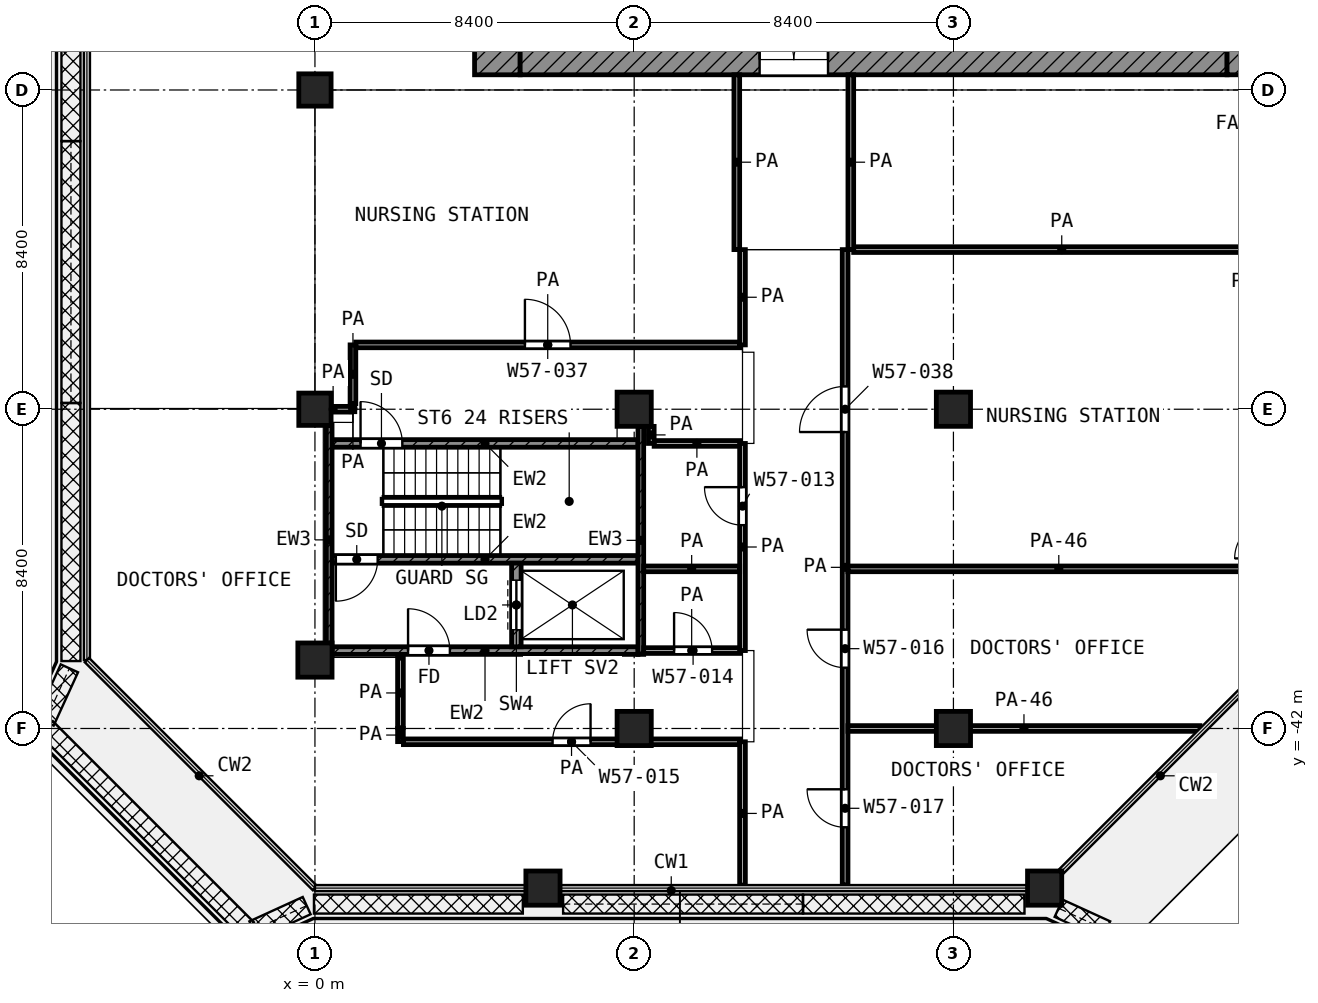
"""IFC4 building model, lengths in metres.
Left out: names, types, materials, properties, quantities, classifications, styles, units other than length and angle.
Written with IfcOpenShell. Run it as: python <this file> out.ifc"""

import sys

from ifc_helpers import new_model, si_unit, direction, frame, frame_2d, origin, origin_2d, place, context, subcontext, project, spatial, rectangle, extrude, element, fill, save


model = new_model("IFC4")
c1 = context("Model", 3, precision=1e-05, world=origin(), true_north=direction((0.0, 1.0)))
c2 = subcontext(c1, "Body", "Model", "MODEL_VIEW")
j1 = project(units=[si_unit("LENGTHUNIT", "METRE"), si_unit("PLANEANGLEUNIT", "RADIAN")], contexts=[c1])
p1 = place(None, origin())
s1 = spatial("IfcSite", under=j1, at=p1, CompositionType="ELEMENT")
p2 = place(p1, origin())
s2 = spatial("IfcBuilding", under=s1, at=p2, CompositionType="ELEMENT")
p3 = place(p2, frame((0.0, 0.0, 247.4)))
s3 = spatial("IfcBuildingStorey", under=s2, at=p3, CompositionType="ELEMENT", Elevation=247.4)
for number, where, z_axis, x_axis in (
    (1, (0.0, -25.2, 0.0), (0.0, 0.0, 1.0), (1.0, 0.0, 0.0)),
    (2, (0.0, -33.6, 0.0), (0.0, 0.0, 1.0), (1.0, 0.0, 0.0)),
):
    element("IfcColumn", number, at=place(p3, frame(where, z_axis=z_axis, x_axis=x_axis)), inside=s3, PredefinedType="COLUMN", context=c2, shape_type="SweptSolid", body=[
        extrude(rectangle(XDim=0.85, YDim=0.85, at=origin_2d()), origin(), (0.0, 0.0, 1.0), 4.2),
    ])
for number, where, z_axis, x_axis in (
    (3, (8.4, -33.6, 0.0), (0.0, 0.0, 1.0), (1.0, 0.0, 0.0)),
    (4, (16.8, -33.6, 0.0), (0.0, 0.0, 1.0), (1.0, 0.0, 0.0)),
    (5, (0.0, -40.2, 0.0), (0.0, 0.0, 1.0), (1.0, 0.0, 0.0)),
    (6, (8.4, -42.0, 0.0), (0.0, 0.0, 1.0), (1.0, 0.0, 0.0)),
    (7, (16.8, -42.0, 0.0), (0.0, 0.0, 1.0), (1.0, 0.0, 0.0)),
    (8, (6.0, -46.2, 0.0), (0.0, 0.0, 1.0), (1.0, 0.0, 0.0)),
    (9, (19.2, -46.2, 0.0), (0.0, 0.0, 1.0), (1.0, 0.0, 0.0)),
):
    element("IfcColumn", number, at=place(p3, frame(where, z_axis=z_axis, x_axis=x_axis)), inside=s3, PredefinedType="COLUMN", context=c2, shape_type="SweptSolid", body=[
        extrude(rectangle(XDim=0.9, YDim=0.9, at=origin_2d()), origin(), (0.0, 0.0, 1.0), 4.2),
    ])
p4 = place(p3, frame((4.8, -24.8, 0.0), z_axis=(0.0, 0.0, 1.0), x_axis=(0.0, 1.0, 0.0)))
e10 = element("IfcWall", 10, at=p4, inside=s3, PredefinedType="SHEAR", context=c2, shape_type="SweptSolid", body=[
    extrude(rectangle(XDim=19.4, YDim=1.2, at=frame_2d((9.7, 0.0))), origin(), (0.0, 0.0, 1.0), 3.6),
])
p5 = place(p4, frame((11.25, 0.0, 0.0)))
e11 = element("IfcOpeningElement", 11, at=p5, cuts=e10, PredefinedType="OPENING", context=c2, shape_type="SweptSolid", body=[
    extrude(rectangle(XDim=1.1, YDim=2.1, at=frame_2d((0.55, 1.05))), frame((0.0, 0.61, 0.0), z_axis=(0.0, -1.0, 0.0), x_axis=(1.0, 0.0, 0.0)), (0.0, 0.0, 1.0), 1.22),
])
p6 = place(p4, frame((1.95, 0.0, 0.0)))
e12 = element("IfcOpeningElement", 12, at=p6, cuts=e10, PredefinedType="OPENING", context=c2, shape_type="SweptSolid", body=[
    extrude(rectangle(XDim=1.1, YDim=2.1, at=frame_2d((0.55, 1.05))), frame((0.0, 0.61, 0.0), z_axis=(0.0, -1.0, 0.0), x_axis=(1.0, 0.0, 0.0)), (0.0, 0.0, 1.0), 1.22),
])
p7 = place(p3, frame((5.4, -24.4, 0.0), z_axis=(0.0, 0.0, 1.0), x_axis=(1.0, 0.0, 0.0)))
e13 = element("IfcWall", 13, at=p7, inside=s3, PredefinedType="SHEAR", context=c2, shape_type="SweptSolid", body=[
    extrude(rectangle(XDim=18.6, YDim=0.8, at=frame_2d((9.3, 0.0))), origin(), (0.0, 0.0, 1.0), 3.6),
])
p8 = place(p7, frame((6.3, 0.0, 0.0)))
e14 = element("IfcOpeningElement", 14, at=p8, cuts=e13, PredefinedType="OPENING", context=c2, shape_type="SweptSolid", body=[
    extrude(rectangle(XDim=1.8, YDim=2.1, at=frame_2d((0.9, 1.05))), frame((0.0, 0.41, 0.0), z_axis=(0.0, -1.0, 0.0), x_axis=(1.0, 0.0, 0.0)), (0.0, 0.0, 1.0), 0.82),
])
p9 = place(p3, frame((24.4, -24.8, 0.0), z_axis=(0.0, 0.0, 1.0), x_axis=(0.0, 1.0, 0.0)))
e15 = element("IfcWall", 15, at=p9, inside=s3, PredefinedType="SHEAR", context=c2, shape_type="SweptSolid", body=[
    extrude(rectangle(XDim=0.8, YDim=0.8, at=frame_2d((0.4, 0.0))), origin(), (0.0, 0.0, 1.0), 3.6),
])
p10 = place(p3, frame((0.375, -40.05, 0.0), z_axis=(0.0, 0.0, 1.0), x_axis=(0.0, 1.0, 0.0)))
e16 = element("IfcWall", 16, at=p10, inside=s3, PredefinedType="SHEAR", context=c2, shape_type="SweptSolid", body=[
    extrude(rectangle(XDim=6.025, YDim=0.15, at=frame_2d((3.013, 0.0))), origin(), (0.0, 0.0, 1.0), 3.6),
])
p11 = place(p3, frame((8.575, -40.05, 0.0), z_axis=(0.0, 0.0, 1.0), x_axis=(0.0, 1.0, 0.0)))
e17 = element("IfcWall", 17, at=p11, inside=s3, PredefinedType="SHEAR", context=c2, shape_type="SweptSolid", body=[
    extrude(rectangle(XDim=6.0, YDim=0.15, at=frame_2d((3.0, 0.0))), origin(), (0.0, 0.0, 1.0), 3.6),
])
p12 = place(p3, frame((0.45, -34.5, 0.0), z_axis=(0.0, 0.0, 1.0), x_axis=(1.0, 0.0, 0.0)))
e18 = element("IfcWall", 18, at=p12, inside=s3, PredefinedType="SHEAR", context=c2, shape_type="SweptSolid", body=[
    extrude(rectangle(XDim=8.05, YDim=0.2, at=frame_2d((4.025, 0.0))), origin(), (0.0, 0.0, 1.0), 3.6),
])
p13 = place(p12, frame((0.75, 0.0, 0.0)))
e19 = element("IfcOpeningElement", 19, at=p13, cuts=e18, PredefinedType="OPENING", context=c2, shape_type="SweptSolid", body=[
    extrude(rectangle(XDim=1.1, YDim=2.1, at=frame_2d((0.55, 1.05))), frame((0.0, 0.11, 0.0), z_axis=(0.0, -1.0, 0.0), x_axis=(1.0, 0.0, 0.0)), (0.0, 0.0, 1.0), 0.22),
])
p14 = place(p3, frame((0.45, -37.55, 0.0), z_axis=(0.0, 0.0, 1.0), x_axis=(1.0, 0.0, 0.0)))
e20 = element("IfcWall", 20, at=p14, inside=s3, PredefinedType="SHEAR", context=c2, shape_type="SweptSolid", body=[
    extrude(rectangle(XDim=8.05, YDim=0.2, at=frame_2d((4.025, 0.0))), origin(), (0.0, 0.0, 1.0), 3.6),
])
p15 = place(p14, frame((0.1, 0.0, 0.0)))
e21 = element("IfcOpeningElement", 21, at=p15, cuts=e20, PredefinedType="OPENING", context=c2, shape_type="SweptSolid", body=[
    extrude(rectangle(XDim=1.1, YDim=2.1, at=frame_2d((0.55, 1.05))), frame((0.0, 0.11, 0.0), z_axis=(0.0, -1.0, 0.0), x_axis=(1.0, 0.0, 0.0)), (0.0, 0.0, 1.0), 0.22),
])
p16 = place(p3, frame((0.45, -39.95, 0.0), z_axis=(0.0, 0.0, 1.0), x_axis=(1.0, 0.0, 0.0)))
e22 = element("IfcWall", 22, at=p16, inside=s3, PredefinedType="SHEAR", context=c2, shape_type="SweptSolid", body=[
    extrude(rectangle(XDim=8.05, YDim=0.2, at=frame_2d((4.025, 0.0))), origin(), (0.0, 0.0, 1.0), 3.6),
])
p17 = place(p16, frame((2.0, 0.0, 0.0)))
e23 = element("IfcOpeningElement", 23, at=p17, cuts=e22, PredefinedType="OPENING", context=c2, shape_type="SweptSolid", body=[
    extrude(rectangle(XDim=1.1, YDim=2.1, at=frame_2d((0.55, 1.05))), frame((0.0, 0.11, 0.0), z_axis=(0.0, -1.0, 0.0), x_axis=(1.0, 0.0, 0.0)), (0.0, 0.0, 1.0), 0.22),
])
p18 = place(p3, frame((5.3, -39.85, 0.0), z_axis=(0.0, 0.0, 1.0), x_axis=(0.0, 1.0, 0.0)))
e24 = element("IfcWall", 24, at=p18, inside=s3, PredefinedType="SHEAR", context=c2, shape_type="SweptSolid", body=[
    extrude(rectangle(XDim=2.2, YDim=0.25, at=frame_2d((1.1, 0.0))), origin(), (0.0, 0.0, 1.0), 3.6),
])
p19 = place(p18, frame((0.45, 0.0, 0.0)))
e25 = element("IfcOpeningElement", 25, at=p19, cuts=e24, PredefinedType="OPENING", context=c2, shape_type="SweptSolid", body=[
    extrude(rectangle(XDim=1.3, YDim=2.1, at=frame_2d((0.65, 1.05))), frame((0.0, 0.135, 0.0), z_axis=(0.0, -1.0, 0.0), x_axis=(1.0, 0.0, 0.0)), (0.0, 0.0, 1.0), 0.27),
])
p20 = place(p3, frame((2.328, -42.35, 0.0), z_axis=(0.0, 0.0, 1.0), x_axis=(1.0, 0.0, 0.0)))
e26 = element("IfcWall", 26, at=p20, inside=s3, PredefinedType="PARTITIONING", context=c2, shape_type="SweptSolid", body=[
    extrude(rectangle(XDim=8.847, YDim=0.15, at=frame_2d((4.424, 0.0))), origin(), (0.0, 0.0, 1.0), 3.6),
])
p21 = place(p20, frame((3.924, 0.0, 0.0)))
e27 = element("IfcOpeningElement", 27, at=p21, cuts=e26, PredefinedType="OPENING", context=c2, shape_type="SweptSolid", body=[
    extrude(rectangle(XDim=1.0, YDim=2.1, at=frame_2d((0.5, 1.05))), frame((0.0, 0.085, 0.0), z_axis=(0.0, -1.0, 0.0), x_axis=(1.0, 0.0, 0.0)), (0.0, 0.0, 1.0), 0.17),
])
p22 = place(p3, frame((14.025, -42.0, 0.0), z_axis=(0.0, 0.0, 1.0), x_axis=(1.0, 0.0, 0.0)))
e28 = element("IfcWall", 28, at=p22, inside=s3, PredefinedType="PARTITIONING", context=c2, shape_type="SweptSolid", body=[
    extrude(rectangle(XDim=9.262, YDim=0.15, at=frame_2d((4.631, 0.0))), origin(), (0.0, 0.0, 1.0), 2.7),
])
p23 = place(p3, frame((8.65, -39.95, 0.0), z_axis=(0.0, 0.0, 1.0), x_axis=(1.0, 0.0, 0.0)))
e29 = element("IfcWall", 29, at=p23, inside=s3, PredefinedType="PARTITIONING", context=c2, shape_type="SweptSolid", body=[
    extrude(rectangle(XDim=2.525, YDim=0.15, at=frame_2d((1.263, 0.0))), origin(), (0.0, 0.0, 1.0), 3.6),
])
p24 = place(p23, frame((0.8, 0.0, 0.0)))
e30 = element("IfcOpeningElement", 30, at=p24, cuts=e29, PredefinedType="OPENING", context=c2, shape_type="SweptSolid", body=[
    extrude(rectangle(XDim=1.0, YDim=2.1, at=frame_2d((0.5, 1.05))), frame((0.0, 0.085, 0.0), z_axis=(0.0, -1.0, 0.0), x_axis=(1.0, 0.0, 0.0)), (0.0, 0.0, 1.0), 0.17),
])
p25 = place(p3, frame((8.65, -37.8, 0.0), z_axis=(0.0, 0.0, 1.0), x_axis=(1.0, 0.0, 0.0)))
e31 = element("IfcWall", 31, at=p25, inside=s3, PredefinedType="PARTITIONING", context=c2, shape_type="SweptSolid", body=[
    extrude(rectangle(XDim=2.525, YDim=0.15, at=frame_2d((1.263, 0.0))), origin(), (0.0, 0.0, 1.0), 3.6),
])
p26 = place(p3, frame((14.025, -37.8, 0.0), z_axis=(0.0, 0.0, 1.0), x_axis=(1.0, 0.0, 0.0)))
e32 = element("IfcWall", 32, at=p26, inside=s3, PredefinedType="PARTITIONING", context=c2, shape_type="SweptSolid", body=[
    extrude(rectangle(XDim=11.095, YDim=0.15, at=frame_2d((5.548, 0.0))), origin(), (0.0, 0.0, 1.0), 2.7),
])
p27 = place(p3, frame((8.925, -34.5, 0.0), z_axis=(0.0, 0.0, 1.0), x_axis=(1.0, 0.0, 0.0)))
e33 = element("IfcWall", 33, at=p27, inside=s3, PredefinedType="PARTITIONING", context=c2, shape_type="SweptSolid", body=[
    extrude(rectangle(XDim=2.25, YDim=0.15, at=frame_2d((1.125, 0.0))), origin(), (0.0, 0.0, 1.0), 3.6),
])
p28 = place(p3, frame((0.006, -33.6, 0.0), z_axis=(0.0, 0.0, 1.0), x_axis=(1.0, 0.0, 0.0)))
e34 = element("IfcWall", 34, at=p28, inside=s3, PredefinedType="PARTITIONING", context=c2, shape_type="SweptSolid", body=[
    extrude(rectangle(XDim=0.944, YDim=0.15, at=frame_2d((0.472, 0.0))), origin(), (0.0, 0.0, 1.0), 3.6),
])
p29 = place(p3, frame((0.95, -33.59, 0.0), z_axis=(0.0, 0.0, 1.0), x_axis=(1.0, 0.0, 0.0)))
e35 = element("IfcWall", 35, at=p29, inside=s3, PredefinedType="PARTITIONING", context=c2, shape_type="SweptSolid", body=[
    extrude(rectangle(XDim=0.099, YDim=0.15, at=frame_2d((0.05, 0.0))), origin(), (0.0, 0.0, 1.0), 3.6),
])
p30 = place(p3, frame((1.075, -31.907, 0.0), z_axis=(0.0, 0.0, 1.0), x_axis=(1.0, 0.0, 0.0)))
e36 = element("IfcWall", 36, at=p30, inside=s3, PredefinedType="PARTITIONING", context=c2, shape_type="SweptSolid", body=[
    extrude(rectangle(XDim=10.1, YDim=0.15, at=frame_2d((5.05, 0.0))), origin(), (0.0, 0.0, 1.0), 3.6),
])
p31 = place(p30, frame((4.45, 0.0, 0.0)))
e37 = element("IfcOpeningElement", 37, at=p31, cuts=e36, PredefinedType="OPENING", context=c2, shape_type="SweptSolid", body=[
    extrude(rectangle(XDim=1.2, YDim=2.1, at=frame_2d((0.6, 1.05))), frame((0.0, 0.085, 0.0), z_axis=(0.0, -1.0, 0.0), x_axis=(1.0, 0.0, 0.0)), (0.0, 0.0, 1.0), 0.17),
])
p32 = place(p3, frame((14.175, -29.4, 0.0), z_axis=(0.0, 0.0, 1.0), x_axis=(1.0, 0.0, 0.0)))
e38 = element("IfcWall", 38, at=p32, inside=s3, PredefinedType="PARTITIONING", context=c2, shape_type="SweptSolid", body=[
    extrude(rectangle(XDim=10.95, YDim=0.15, at=frame_2d((5.475, 0.0))), origin(), (0.0, 0.0, 1.0), 3.6),
])
p33 = place(p3, frame((1.0, -33.455, 0.0), z_axis=(0.0, 0.0, 1.0), x_axis=(0.0, 1.0, 0.0)))
e39 = element("IfcWall", 39, at=p33, inside=s3, PredefinedType="PARTITIONING", context=c2, shape_type="SweptSolid", body=[
    extrude(rectangle(XDim=1.548, YDim=0.15, at=frame_2d((0.774, 0.0))), origin(), (0.0, 0.0, 1.0), 3.6),
])
p34 = place(p3, frame((2.25, -42.346, 0.0), z_axis=(0.0, 0.0, 1.0), x_axis=(0.0, 1.0, 0.0)))
e40 = element("IfcWall", 40, at=p34, inside=s3, PredefinedType="PARTITIONING", context=c2, shape_type="SweptSolid", body=[
    extrude(rectangle(XDim=0.346, YDim=0.15, at=frame_2d((0.173, 0.0))), origin(), (0.0, 0.0, 1.0), 3.6),
])
p35 = place(p3, frame((2.25, -41.98, 0.0), z_axis=(0.0, 0.0, 1.0), x_axis=(0.0, 1.0, 0.0)))
e41 = element("IfcWall", 41, at=p35, inside=s3, PredefinedType="PARTITIONING", context=c2, shape_type="SweptSolid", body=[
    extrude(rectangle(XDim=1.83, YDim=0.15, at=frame_2d((0.915, 0.0))), origin(), (0.0, 0.0, 1.0), 3.6),
])
p36 = place(p3, frame((8.85, -34.5, 0.0), z_axis=(0.0, 0.0, 1.0), x_axis=(0.0, 1.0, 0.0)))
e42 = element("IfcWall", 42, at=p36, inside=s3, PredefinedType="PARTITIONING", context=c2, shape_type="SweptSolid", body=[
    extrude(rectangle(XDim=0.449, YDim=0.15, at=frame_2d((0.225, 0.0))), origin(), (0.0, 0.0, 1.0), 3.6),
])
p37 = place(p3, frame((11.1, -29.4, 0.0), z_axis=(0.0, 0.0, 1.0), x_axis=(0.0, 1.0, 0.0)))
e43 = element("IfcWall", 43, at=p37, inside=s3, PredefinedType="PARTITIONING", context=c2, shape_type="SweptSolid", body=[
    extrude(rectangle(XDim=4.6, YDim=0.15, at=frame_2d((2.3, 0.0))), origin(), (0.0, 0.0, 1.0), 3.6),
])
p38 = place(p3, frame((11.25, -46.12, 0.0), z_axis=(0.0, 0.0, 1.0), x_axis=(0.0, 1.0, 0.0)))
e44 = element("IfcWall", 44, at=p38, inside=s3, PredefinedType="PARTITIONING", context=c2, shape_type="SweptSolid", body=[
    extrude(rectangle(XDim=3.77, YDim=0.15, at=frame_2d((1.885, 0.0))), origin(), (0.0, 0.0, 1.0), 3.6),
])
p39 = place(p3, frame((11.25, -39.95, 0.0), z_axis=(0.0, 0.0, 1.0), x_axis=(0.0, 1.0, 0.0)))
e45 = element("IfcWall", 45, at=p39, inside=s3, PredefinedType="PARTITIONING", context=c2, shape_type="SweptSolid", body=[
    extrude(rectangle(XDim=5.45, YDim=0.15, at=frame_2d((2.725, 0.0))), origin(), (0.0, 0.0, 1.0), 3.6),
])
p40 = place(p39, frame((3.3, 0.0, 0.0)))
e46 = element("IfcOpeningElement", 46, at=p40, cuts=e45, PredefinedType="OPENING", context=c2, shape_type="SweptSolid", body=[
    extrude(rectangle(XDim=1.0, YDim=2.1, at=frame_2d((0.5, 1.05))), frame((0.0, 0.085, 0.0), z_axis=(0.0, -1.0, 0.0), x_axis=(1.0, 0.0, 0.0)), (0.0, 0.0, 1.0), 0.17),
])
p41 = place(p3, frame((11.25, -31.907, 0.0), z_axis=(0.0, 0.0, 1.0), x_axis=(0.0, 1.0, 0.0)))
e47 = element("IfcWall", 47, at=p41, inside=s3, PredefinedType="PARTITIONING", context=c2, shape_type="SweptSolid", body=[
    extrude(rectangle(XDim=2.507, YDim=0.15, at=frame_2d((1.253, 0.0))), origin(), (0.0, 0.0, 1.0), 3.6),
])
p42 = place(p3, frame((13.95, -46.12, 0.0), z_axis=(0.0, 0.0, 1.0), x_axis=(0.0, 1.0, 0.0)))
e48 = element("IfcWall", 48, at=p42, inside=s3, PredefinedType="PARTITIONING", context=c2, shape_type="SweptSolid", body=[
    extrude(rectangle(XDim=16.72, YDim=0.15, at=frame_2d((8.36, 0.0))), origin(), (0.0, 0.0, 1.0), 3.6),
])
p43 = place(p42, frame((11.92, 0.0, 0.0)))
e49 = element("IfcOpeningElement", 49, at=p43, cuts=e48, PredefinedType="OPENING", context=c2, shape_type="SweptSolid", body=[
    extrude(rectangle(XDim=1.2, YDim=2.1, at=frame_2d((0.6, 1.05))), frame((0.0, 0.085, 0.0), z_axis=(0.0, -1.0, 0.0), x_axis=(1.0, 0.0, 0.0)), (0.0, 0.0, 1.0), 0.17),
])
p44 = place(p42, frame((5.72, 0.0, 0.0)))
e50 = element("IfcOpeningElement", 50, at=p44, cuts=e48, PredefinedType="OPENING", context=c2, shape_type="SweptSolid", body=[
    extrude(rectangle(XDim=1.0, YDim=2.1, at=frame_2d((0.5, 1.05))), frame((0.0, 0.085, 0.0), z_axis=(0.0, -1.0, 0.0), x_axis=(1.0, 0.0, 0.0)), (0.0, 0.0, 1.0), 0.17),
])
p45 = place(p42, frame((1.52, 0.0, 0.0)))
e51 = element("IfcOpeningElement", 51, at=p45, cuts=e48, PredefinedType="OPENING", context=c2, shape_type="SweptSolid", body=[
    extrude(rectangle(XDim=1.0, YDim=2.1, at=frame_2d((0.5, 1.05))), frame((0.0, 0.085, 0.0), z_axis=(0.0, -1.0, 0.0), x_axis=(1.0, 0.0, 0.0)), (0.0, 0.0, 1.0), 0.17),
])
p46 = place(p3, frame((14.1, -29.4, 0.0), z_axis=(0.0, 0.0, 1.0), x_axis=(0.0, 1.0, 0.0)))
e52 = element("IfcWall", 52, at=p46, inside=s3, PredefinedType="PARTITIONING", context=c2, shape_type="SweptSolid", body=[
    extrude(rectangle(XDim=4.6, YDim=0.15, at=frame_2d((2.3, 0.0))), origin(), (0.0, 0.0, 1.0), 3.6),
])
p47 = place(p8, origin())
e53 = element("IfcDoor", 53, at=p47, inside=s3, OperationType="DOUBLE_DOOR_SINGLE_SWING", PredefinedType="DOOR", context=c2, shape_type="SweptSolid", body=[
    extrude(rectangle(XDim=1.8, YDim=2.1, at=frame_2d((0.9, 1.05))), frame((0.0, 0.025, 0.0), z_axis=(0.0, -1.0, 0.0), x_axis=(1.0, 0.0, 0.0)), (0.0, 0.0, 1.0), 0.05),
])
fill(e14, e53)
p48 = place(p13, origin())
e54 = element("IfcDoor", 54, at=p48, inside=s3, OperationType="SINGLE_SWING_LEFT", PredefinedType="DOOR", context=c2, shape_type="SweptSolid", body=[
    extrude(rectangle(XDim=1.1, YDim=2.1, at=frame_2d((0.55, 1.05))), frame((0.0, 0.025, 0.0), z_axis=(0.0, -1.0, 0.0), x_axis=(1.0, 0.0, 0.0)), (0.0, 0.0, 1.0), 0.05),
])
fill(e19, e54)
p49 = place(p15, frame((1.1, 0.0, 0.0), z_axis=(0.0, 0.0, 1.0), x_axis=(-1.0, 0.0, 0.0)))
e55 = element("IfcDoor", 55, at=p49, inside=s3, OperationType="SINGLE_SWING_LEFT", PredefinedType="DOOR", context=c2, shape_type="SweptSolid", body=[
    extrude(rectangle(XDim=1.1, YDim=2.1, at=frame_2d((0.55, 1.05))), frame((0.0, 0.025, 0.0), z_axis=(0.0, -1.0, 0.0), x_axis=(1.0, 0.0, 0.0)), (0.0, 0.0, 1.0), 0.05),
])
fill(e21, e55)
p50 = place(p19, origin())
e56 = element("IfcDoor", 56, at=p50, inside=s3, OperationType="DOUBLE_DOOR_SLIDING", PredefinedType="DOOR", context=c2, shape_type="SweptSolid", body=[
    extrude(rectangle(XDim=1.3, YDim=2.1, at=frame_2d((0.65, 1.05))), frame((0.0, 0.025, 0.0), z_axis=(0.0, -1.0, 0.0), x_axis=(1.0, 0.0, 0.0)), (0.0, 0.0, 1.0), 0.05),
])
fill(e25, e56)
p51 = place(p17, origin())
e57 = element("IfcDoor", 57, at=p51, inside=s3, OperationType="SINGLE_SWING_LEFT", PredefinedType="DOOR", context=c2, shape_type="SweptSolid", body=[
    extrude(rectangle(XDim=1.1, YDim=2.1, at=frame_2d((0.55, 1.05))), frame((0.0, 0.025, 0.0), z_axis=(0.0, -1.0, 0.0), x_axis=(1.0, 0.0, 0.0)), (0.0, 0.0, 1.0), 0.05),
])
fill(e23, e57)
p52 = place(p31, origin())
e58 = element("IfcDoor", 58, at=p52, inside=s3, OperationType="SINGLE_SWING_LEFT", PredefinedType="DOOR", context=c2, shape_type="SweptSolid", body=[
    extrude(rectangle(XDim=1.2, YDim=2.1, at=frame_2d((0.6, 1.05))), frame((0.0, 0.025, 0.0), z_axis=(0.0, -1.0, 0.0), x_axis=(1.0, 0.0, 0.0)), (0.0, 0.0, 1.0), 0.05),
])
fill(e37, e58)
p53 = place(p40, origin())
e59 = element("IfcDoor", 59, at=p53, inside=s3, OperationType="SINGLE_SWING_RIGHT", PredefinedType="DOOR", context=c2, shape_type="SweptSolid", body=[
    extrude(rectangle(XDim=1.0, YDim=2.1, at=frame_2d((0.5, 1.05))), frame((0.0, 0.025, 0.0), z_axis=(0.0, -1.0, 0.0), x_axis=(1.0, 0.0, 0.0)), (0.0, 0.0, 1.0), 0.05),
])
fill(e46, e59)
p54 = place(p24, origin())
e60 = element("IfcDoor", 60, at=p54, inside=s3, OperationType="SINGLE_SWING_LEFT", PredefinedType="DOOR", context=c2, shape_type="SweptSolid", body=[
    extrude(rectangle(XDim=1.0, YDim=2.1, at=frame_2d((0.5, 1.05))), frame((0.0, 0.025, 0.0), z_axis=(0.0, -1.0, 0.0), x_axis=(1.0, 0.0, 0.0)), (0.0, 0.0, 1.0), 0.05),
])
fill(e30, e60)
p55 = place(p21, origin())
e61 = element("IfcDoor", 61, at=p55, inside=s3, OperationType="SINGLE_SWING_RIGHT", PredefinedType="DOOR", context=c2, shape_type="SweptSolid", body=[
    extrude(rectangle(XDim=1.0, YDim=2.1, at=frame_2d((0.5, 1.05))), frame((0.0, 0.025, 0.0), z_axis=(0.0, -1.0, 0.0), x_axis=(1.0, 0.0, 0.0)), (0.0, 0.0, 1.0), 0.05),
])
fill(e27, e61)
p56 = place(p43, origin())
e62 = element("IfcDoor", 62, at=p56, inside=s3, OperationType="SINGLE_SWING_LEFT", PredefinedType="DOOR", context=c2, shape_type="SweptSolid", body=[
    extrude(rectangle(XDim=1.2, YDim=2.1, at=frame_2d((0.6, 1.05))), frame((0.0, 0.025, 0.0), z_axis=(0.0, -1.0, 0.0), x_axis=(1.0, 0.0, 0.0)), (0.0, 0.0, 1.0), 0.05),
])
fill(e49, e62)
p57 = place(p44, origin())
e63 = element("IfcDoor", 63, at=p57, inside=s3, OperationType="SINGLE_SWING_RIGHT", PredefinedType="DOOR", context=c2, shape_type="SweptSolid", body=[
    extrude(rectangle(XDim=1.0, YDim=2.1, at=frame_2d((0.5, 1.05))), frame((0.0, 0.025, 0.0), z_axis=(0.0, -1.0, 0.0), x_axis=(1.0, 0.0, 0.0)), (0.0, 0.0, 1.0), 0.05),
])
fill(e50, e63)
p58 = place(p45, origin())
e64 = element("IfcDoor", 64, at=p58, inside=s3, OperationType="SINGLE_SWING_RIGHT", PredefinedType="DOOR", context=c2, shape_type="SweptSolid", body=[
    extrude(rectangle(XDim=1.0, YDim=2.1, at=frame_2d((0.5, 1.05))), frame((0.0, 0.025, 0.0), z_axis=(0.0, -1.0, 0.0), x_axis=(1.0, 0.0, 0.0)), (0.0, 0.0, 1.0), 0.05),
])
fill(e51, e64)
save(model, sys.argv[1])
